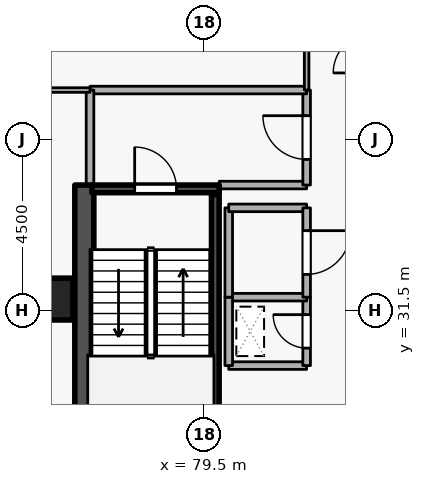
"""IFC4 building model, lengths in metres.
Left out: names, types, materials, properties, quantities, classifications, styles, units other than length and angle.
Written with IfcOpenShell. Run it as: python <this file> out.ifc"""

import sys

from ifc_helpers import new_model, si_unit, direction, frame, frame_2d, origin, origin_2d, place, context, subcontext, project, spatial, rectangle, extrude, element, fill, save


model = new_model("IFC4")
c1 = context("Model", 3, precision=1e-05, world=origin(), true_north=direction((0.0, 1.0)))
c2 = subcontext(c1, "Body", "Model", "MODEL_VIEW")
j1 = project(units=[si_unit("LENGTHUNIT", "METRE"), si_unit("PLANEANGLEUNIT", "RADIAN")], contexts=[c1])
p1 = place(None, origin())
s1 = spatial("IfcSite", under=j1, at=p1, CompositionType="ELEMENT")
p2 = place(p1, origin())
s2 = spatial("IfcBuilding", under=s1, at=p2, CompositionType="ELEMENT")
p3 = place(p2, frame((0.0, 0.0, 167.1)))
s3 = spatial("IfcBuildingStorey", under=s2, at=p3, CompositionType="ELEMENT", Elevation=167.1)
p4 = place(p3, frame((76.35, 19.2, 0.0), z_axis=(0.0, 0.0, 1.0), x_axis=(0.0, 1.0, 0.0)))
e1 = element("IfcWall", 1, at=p4, inside=s3, PredefinedType="SHEAR", context=c2, shape_type="SweptSolid", body=[
    extrude(rectangle(XDim=15.6, YDim=0.5, at=frame_2d((7.8, 0.0))), origin(), (0.0, 0.0, 1.0), 3.6),
])
p5 = place(p3, frame((75.5, 31.8, 0.0), z_axis=(0.0, 0.0, 1.0), x_axis=(1.0, 0.0, 0.0)))
e2 = element("IfcColumn", 2, at=p5, inside=s3, PredefinedType="COLUMN", context=c2, shape_type="SweptSolid", body=[
    extrude(rectangle(XDim=1.1, YDim=1.1, at=origin_2d()), origin(), (0.0, 0.0, 1.0), 3.6),
])
p6 = place(p3, frame((76.55, 34.7, 0.0), z_axis=(0.0, 0.0, 1.0), x_axis=(1.0, 0.0, 0.0)))
e3 = element("IfcWall", 3, at=p6, inside=s3, PredefinedType="SHEAR", context=c2, shape_type="SweptSolid", body=[
    extrude(rectangle(XDim=3.35, YDim=0.2, at=frame_2d((1.675, 0.0))), origin(), (0.0, 0.0, 1.0), 3.6),
])
p7 = place(p6, frame((1.125, 0.0, 0.0)))
e4 = element("IfcOpeningElement", 4, at=p7, cuts=e3, PredefinedType="OPENING", context=c2, shape_type="SweptSolid", body=[
    extrude(rectangle(XDim=1.1, YDim=2.1, at=frame_2d((0.55, 1.05))), frame((0.0, 0.11, 0.0), z_axis=(0.0, -1.0, 0.0), x_axis=(1.0, 0.0, 0.0)), (0.0, 0.0, 1.0), 0.22),
])
p8 = place(p3, frame((79.797, 27.45, 0.0), z_axis=(0.0, 0.0, 1.0), x_axis=(0.0, 1.0, 0.0)))
e5 = element("IfcWall", 5, at=p8, inside=s3, PredefinedType="SHEAR", context=c2, shape_type="SweptSolid", body=[
    extrude(rectangle(XDim=7.1, YDim=0.2, at=frame_2d((3.55, 0.0))), origin(), (0.0, 0.0, 1.0), 3.6),
])
p9 = place(p3, frame((79.9, 34.8, 0.0), z_axis=(0.0, 0.0, 1.0), x_axis=(1.0, 0.0, 0.0)))
e6 = element("IfcWall", 6, at=p9, inside=s3, PredefinedType="STANDARD", context=c2, shape_type="SweptSolid", body=[
    extrude(rectangle(XDim=2.3, YDim=0.2, at=frame_2d((1.15, 0.0))), origin(), (0.0, 0.0, 1.0), 2.545),
])
p10 = place(p3, frame((82.2, 34.8, 0.0), z_axis=(0.0, 0.0, 1.0), x_axis=(0.0, 1.0, 0.0)))
e7 = element("IfcWall", 7, at=p10, inside=s3, PredefinedType="STANDARD", context=c2, shape_type="SweptSolid", body=[
    extrude(rectangle(XDim=2.5, YDim=0.2, at=frame_2d((1.25, 0.0))), origin(), (0.0, 0.0, 1.0), 3.34),
])
p11 = place(p10, frame((0.675, 0.0, 0.0)))
e8 = element("IfcOpeningElement", 8, at=p11, cuts=e7, PredefinedType="OPENING", context=c2, shape_type="SweptSolid", body=[
    extrude(rectangle(XDim=1.15, YDim=2.1, at=frame_2d((0.575, 1.05))), frame((0.0, 0.11, 0.0), z_axis=(0.0, -1.0, 0.0), x_axis=(1.0, 0.0, 0.0)), (0.0, 0.0, 1.0), 0.22),
])
p12 = place(p3, frame((82.2, 37.3, 0.0), z_axis=(0.0, 0.0, 1.0), x_axis=(-1.0, 0.0, 0.0)))
e9 = element("IfcWall", 9, at=p12, inside=s3, PredefinedType="STANDARD", context=c2, shape_type="SweptSolid", body=[
    extrude(rectangle(XDim=5.7, YDim=0.2, at=frame_2d((2.85, 0.0))), origin(), (0.0, 0.0, 1.0), 3.34),
])
p13 = place(p3, frame((76.5, 37.3, 0.0), z_axis=(0.0, 0.0, 1.0), x_axis=(0.0, -1.0, 0.0)))
e10 = element("IfcWall", 10, at=p13, inside=s3, PredefinedType="STANDARD", context=c2, shape_type="SweptSolid", body=[
    extrude(rectangle(XDim=2.5, YDim=0.2, at=frame_2d((1.25, 0.0))), origin(), (0.0, 0.0, 1.0), 3.34),
])
p14 = place(p3, frame((80.15, 30.05, 0.0), z_axis=(0.0, 0.0, 1.0), x_axis=(1.0, 0.0, 0.0)))
e11 = element("IfcWall", 11, at=p14, inside=s3, PredefinedType="STANDARD", context=c2, shape_type="SweptSolid", body=[
    extrude(rectangle(XDim=2.05, YDim=0.2, at=frame_2d((1.025, 0.0))), origin(), (0.0, 0.0, 1.0), 3.34),
])
p15 = place(p3, frame((82.2, 30.05, 0.0), z_axis=(0.0, 0.0, 1.0), x_axis=(0.0, 1.0, 0.0)))
e12 = element("IfcWall", 12, at=p15, inside=s3, PredefinedType="STANDARD", context=c2, shape_type="SweptSolid", body=[
    extrude(rectangle(XDim=1.8, YDim=0.2, at=frame_2d((0.9, 0.0))), origin(), (0.0, 0.0, 1.0), 3.34),
])
p16 = place(p15, frame((0.46, 0.0, 0.0)))
e13 = element("IfcOpeningElement", 13, at=p16, cuts=e12, PredefinedType="OPENING", context=c2, shape_type="SweptSolid", body=[
    extrude(rectangle(XDim=0.88, YDim=2.04, at=frame_2d((0.44, 1.02))), frame((0.0, 0.11, 0.0), z_axis=(0.0, -1.0, 0.0), x_axis=(1.0, 0.0, 0.0)), (0.0, 0.0, 1.0), 0.22),
])
p17 = place(p3, frame((82.2, 31.85, 0.0), z_axis=(0.0, 0.0, 1.0), x_axis=(-1.0, 0.0, 0.0)))
e14 = element("IfcWall", 14, at=p17, inside=s3, PredefinedType="STANDARD", context=c2, shape_type="SweptSolid", body=[
    extrude(rectangle(XDim=2.05, YDim=0.2, at=frame_2d((1.025, 0.0))), origin(), (0.0, 0.0, 1.0), 3.34),
])
p18 = place(p3, frame((80.15, 31.85, 0.0), z_axis=(0.0, 0.0, 1.0), x_axis=(0.0, -1.0, 0.0)))
e15 = element("IfcWall", 15, at=p18, inside=s3, PredefinedType="STANDARD", context=c2, shape_type="SweptSolid", body=[
    extrude(rectangle(XDim=1.8, YDim=0.2, at=frame_2d((0.9, 0.0))), origin(), (0.0, 0.0, 1.0), 3.34),
])
p19 = place(p3, frame((80.15, 31.85, 0.0), z_axis=(0.0, 0.0, 1.0), x_axis=(0.0, 1.0, 0.0)))
e16 = element("IfcWall", 16, at=p19, inside=s3, PredefinedType="STANDARD", context=c2, shape_type="SweptSolid", body=[
    extrude(rectangle(XDim=2.35, YDim=0.2, at=frame_2d((1.175, 0.0))), origin(), (0.0, 0.0, 1.0), 3.34),
])
p20 = place(p3, frame((80.15, 34.2, 0.0), z_axis=(0.0, 0.0, 1.0), x_axis=(1.0, 0.0, 0.0)))
e17 = element("IfcWall", 17, at=p20, inside=s3, PredefinedType="STANDARD", context=c2, shape_type="SweptSolid", body=[
    extrude(rectangle(XDim=2.05, YDim=0.2, at=frame_2d((1.025, 0.0))), origin(), (0.0, 0.0, 1.0), 2.545),
])
p21 = place(p3, frame((82.2, 34.2, 0.0), z_axis=(0.0, 0.0, 1.0), x_axis=(0.0, -1.0, 0.0)))
e18 = element("IfcWall", 18, at=p21, inside=s3, PredefinedType="STANDARD", context=c2, shape_type="SweptSolid", body=[
    extrude(rectangle(XDim=2.35, YDim=0.2, at=frame_2d((1.175, 0.0))), origin(), (0.0, 0.0, 1.0), 3.34),
])
p22 = place(p21, frame((0.6, 0.0, 0.0)))
e19 = element("IfcOpeningElement", 19, at=p22, cuts=e18, PredefinedType="OPENING", context=c2, shape_type="SweptSolid", body=[
    extrude(rectangle(XDim=1.15, YDim=2.1, at=frame_2d((0.575, 1.05))), frame((0.0, 0.11, 0.0), z_axis=(0.0, -1.0, 0.0), x_axis=(1.0, 0.0, 0.0)), (0.0, 0.0, 1.0), 0.22),
])
p23 = place(p3, frame((82.2, 39.25, 0.0), z_axis=(0.0, 0.0, 1.0), x_axis=(0.0, -1.0, 0.0)))
e20 = element("IfcWall", 20, at=p23, inside=s3, PredefinedType="PARTITIONING", context=c2, shape_type="SweptSolid", body=[
    extrude(rectangle(XDim=1.95, YDim=0.12, at=frame_2d((0.975, 0.0))), origin(), (0.0, 0.0, 1.0), 3.34),
])
p24 = place(p3, frame((76.5, 37.3, 0.0), z_axis=(0.0, 0.0, 1.0), x_axis=(-1.0, 0.0, 0.0)))
e21 = element("IfcWall", 21, at=p24, inside=s3, PredefinedType="PARTITIONING", context=c2, shape_type="SweptSolid", body=[
    extrude(rectangle(XDim=5.72, YDim=0.12, at=frame_2d((2.86, 0.0))), origin(), (0.0, 0.0, 1.0), 3.34),
])
p25 = place(p7, origin())
e22 = element("IfcDoor", 22, at=p25, inside=s3, OperationType="SINGLE_SWING_LEFT", PredefinedType="DOOR", context=c2, shape_type="SweptSolid", body=[
    extrude(rectangle(XDim=1.1, YDim=2.1, at=frame_2d((0.55, 1.05))), frame((0.0, 0.025, 0.0), z_axis=(0.0, -1.0, 0.0), x_axis=(1.0, 0.0, 0.0)), (0.0, 0.0, 1.0), 0.05),
])
fill(e4, e22)
p26 = place(p11, origin())
e23 = element("IfcDoor", 23, at=p26, inside=s3, OperationType="SINGLE_SWING_RIGHT", PredefinedType="DOOR", context=c2, shape_type="SweptSolid", body=[
    extrude(rectangle(XDim=1.15, YDim=2.1, at=frame_2d((0.575, 1.05))), frame((0.0, 0.025, 0.0), z_axis=(0.0, -1.0, 0.0), x_axis=(1.0, 0.0, 0.0)), (0.0, 0.0, 1.0), 0.05),
])
fill(e8, e23)
p27 = place(p16, origin())
e24 = element("IfcDoor", 24, at=p27, inside=s3, OperationType="SINGLE_SWING_RIGHT", PredefinedType="DOOR", context=c2, shape_type="SweptSolid", body=[
    extrude(rectangle(XDim=0.88, YDim=2.04, at=frame_2d((0.44, 1.02))), frame((0.0, 0.025, 0.0), z_axis=(0.0, -1.0, 0.0), x_axis=(1.0, 0.0, 0.0)), (0.0, 0.0, 1.0), 0.05),
])
fill(e13, e24)
p28 = place(p22, origin())
e25 = element("IfcDoor", 25, at=p28, inside=s3, OperationType="SINGLE_SWING_LEFT", PredefinedType="DOOR", context=c2, shape_type="SweptSolid", body=[
    extrude(rectangle(XDim=1.15, YDim=2.1, at=frame_2d((0.575, 1.05))), frame((0.0, 0.025, 0.0), z_axis=(0.0, -1.0, 0.0), x_axis=(1.0, 0.0, 0.0)), (0.0, 0.0, 1.0), 0.05),
])
fill(e19, e25)
save(model, sys.argv[1])
